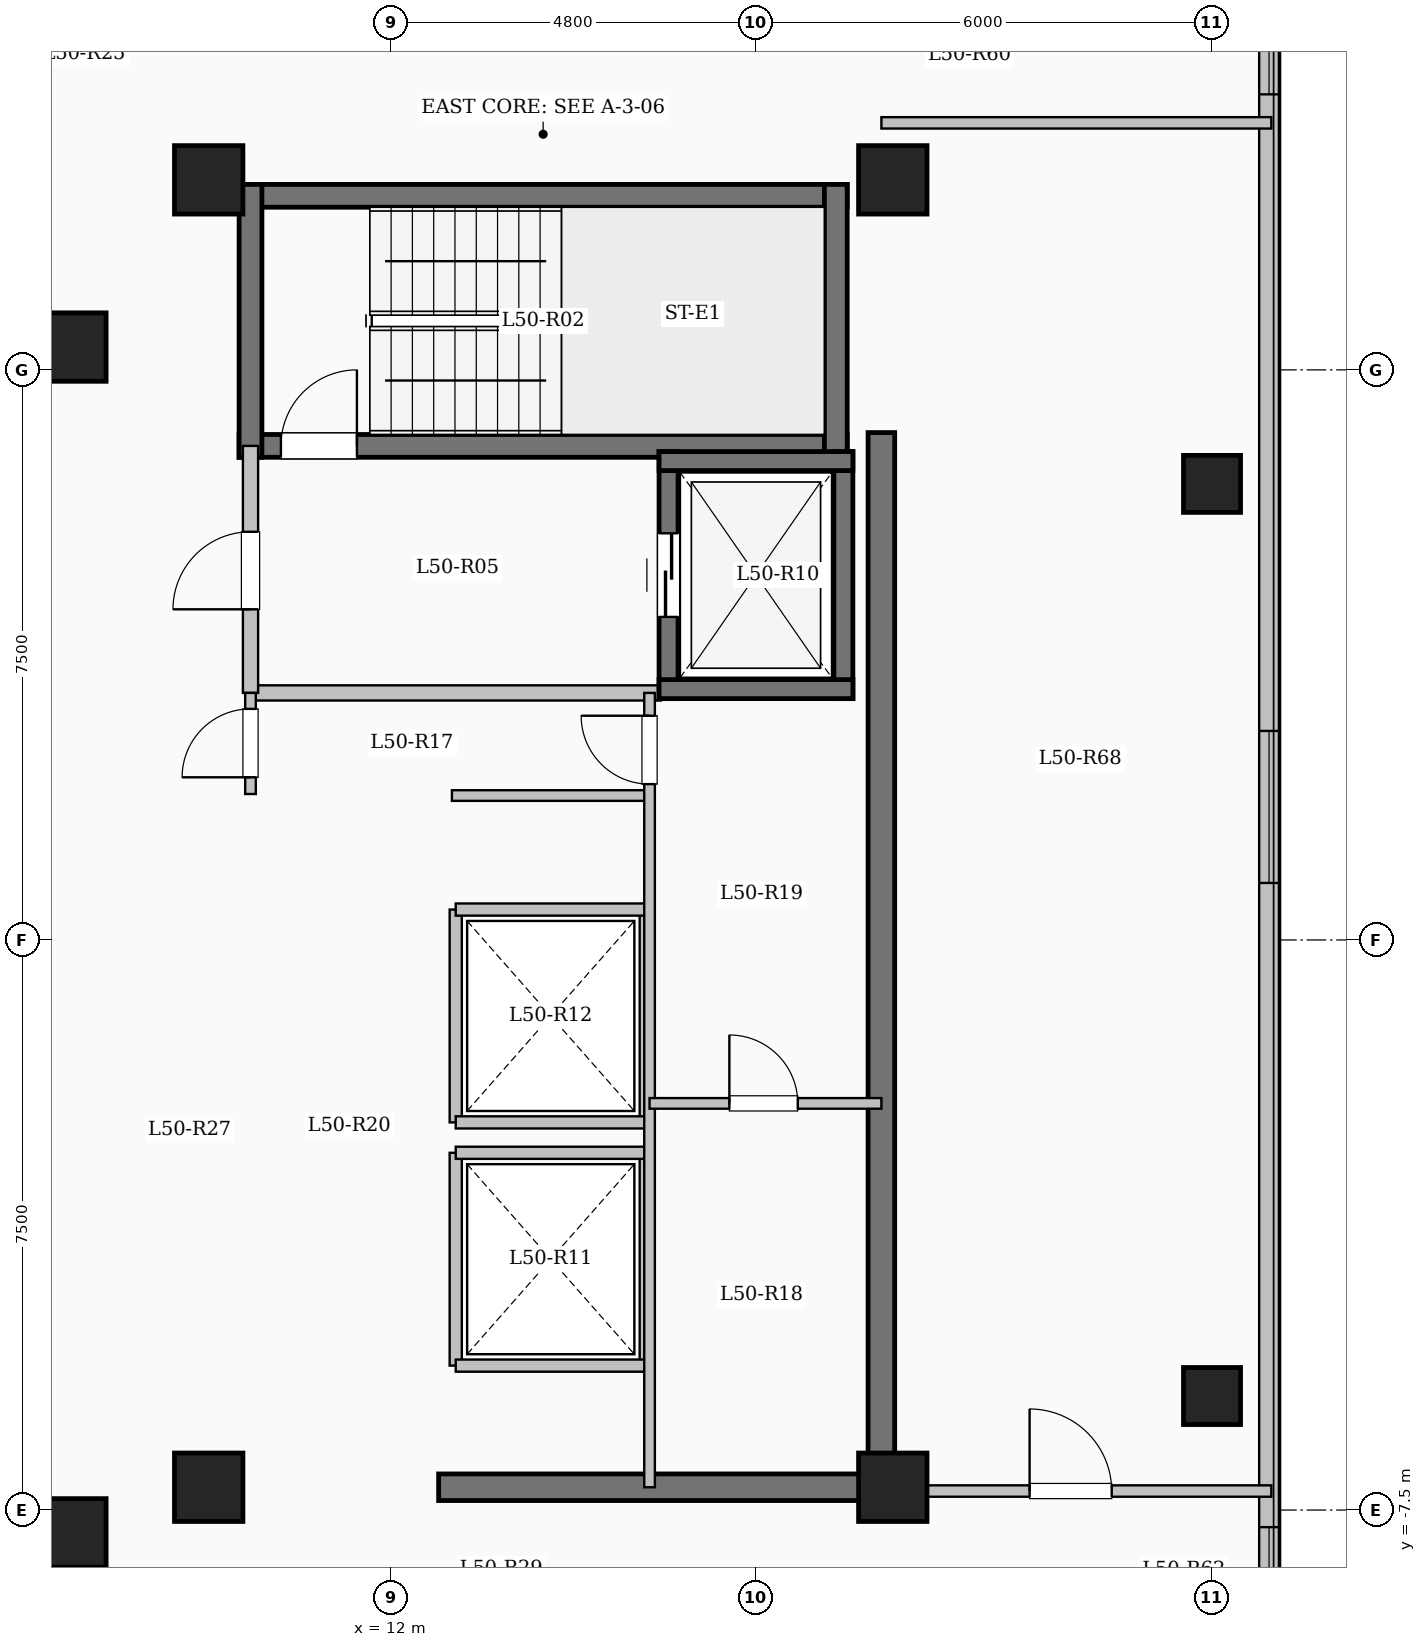
"""IFC4 building model, lengths in metres.
Left out: names, types, materials, properties, quantities, classifications, styles, units other than length and angle.
Written with IfcOpenShell. Run it as: python <this file> out.ifc"""

import sys

from ifc_helpers import new_model, si_unit, direction, frame, frame_2d, origin, origin_2d, place, context, subcontext, project, spatial, rectangle, extrude, element, fill, save


model = new_model("IFC4")
c1 = context("Model", 3, precision=1e-05, world=origin(), true_north=direction((0.0, 1.0)))
c2 = subcontext(c1, "Body", "Model", "MODEL_VIEW")
j1 = project(units=[si_unit("LENGTHUNIT", "METRE"), si_unit("PLANEANGLEUNIT", "RADIAN")], contexts=[c1])
p1 = place(None, origin())
s1 = spatial("IfcSite", under=j1, at=p1, CompositionType="ELEMENT")
p2 = place(p1, origin())
s2 = spatial("IfcBuilding", under=s1, at=p2, CompositionType="ELEMENT")
p3 = place(p2, frame((0.0, 0.0, 186.9)))
s3 = spatial("IfcBuildingStorey", under=s2, at=p3, CompositionType="ELEMENT", Elevation=186.9)
for number, where, z_axis, x_axis in (
    (1, (7.8, -7.8, 0.0), (0.0, 0.0, 1.0), (1.0, 0.0, 0.0)),
    (2, (7.8, 7.8, 0.0), (0.0, 0.0, 1.0), (1.0, 0.0, 0.0)),
    (3, (9.6, -7.2, 0.0), (0.0, 0.0, 1.0), (1.0, 0.0, 0.0)),
    (4, (9.6, 10.0, 0.0), (0.0, 0.0, 1.0), (1.0, 0.0, 0.0)),
    (5, (18.6, -7.2, 0.0), (0.0, 0.0, 1.0), (1.0, 0.0, 0.0)),
    (6, (18.6, 10.0, 0.0), (0.0, 0.0, 1.0), (1.0, 0.0, 0.0)),
):
    element("IfcColumn", number, at=place(p3, frame(where, z_axis=z_axis, x_axis=x_axis)), inside=s3, PredefinedType="COLUMN", context=c2, shape_type="SweptSolid", body=[
        extrude(rectangle(XDim=0.9, YDim=0.9, at=origin_2d()), origin(), (0.0, 0.0, 1.0), 3.35),
    ])
for number, where, z_axis, x_axis in (
    (7, (22.8, -6.0, 0.0), (0.0, 0.0, 1.0), (1.0, 0.0, 0.0)),
    (8, (22.8, 6.0, 0.0), (0.0, 0.0, 1.0), (1.0, 0.0, 0.0)),
):
    element("IfcColumn", number, at=place(p3, frame(where, z_axis=z_axis, x_axis=x_axis)), inside=s3, PredefinedType="COLUMN", context=c2, shape_type="SweptSolid", body=[
        extrude(rectangle(XDim=0.75, YDim=0.75, at=origin_2d()), origin(), (0.0, 0.0, 1.0), 3.35),
    ])
p4 = place(p3, frame((23.55, 17.25, 0.0), z_axis=(0.0, 0.0, 1.0), x_axis=(0.0, -1.0, 0.0)))
e9 = element("IfcWall", 9, at=p4, inside=s3, PredefinedType="SOLIDWALL", context=c2, shape_type="SweptSolid", body=[
    extrude(rectangle(XDim=34.5, YDim=0.26, at=frame_2d((17.25, 0.0))), origin(), (0.0, 0.0, 1.0), 3.1),
])
p5 = place(p4, frame((1.375, 0.0, 0.9)))
e10 = element("IfcOpeningElement", 10, at=p5, cuts=e9, PredefinedType="OPENING", context=c2, shape_type="SweptSolid", body=[
    extrude(rectangle(XDim=2.0, YDim=1.7, at=frame_2d((1.0, 0.85))), frame((0.0, 0.14, 0.0), z_axis=(0.0, -1.0, 0.0), x_axis=(1.0, 0.0, 0.0)), (0.0, 0.0, 1.0), 0.28),
])
p6 = place(p4, frame((5.125, 0.0, 0.95)))
e11 = element("IfcOpeningElement", 11, at=p6, cuts=e9, PredefinedType="OPENING", context=c2, shape_type="SweptSolid", body=[
    extrude(rectangle(XDim=1.0, YDim=1.5, at=frame_2d((0.5, 0.75))), frame((0.0, 0.14, 0.0), z_axis=(0.0, -1.0, 0.0), x_axis=(1.0, 0.0, 0.0)), (0.0, 0.0, 1.0), 0.28),
])
p7 = place(p4, frame((14.5, 0.0, 0.9)))
e12 = element("IfcOpeningElement", 12, at=p7, cuts=e9, PredefinedType="OPENING", context=c2, shape_type="SweptSolid", body=[
    extrude(rectangle(XDim=2.0, YDim=1.7, at=frame_2d((1.0, 0.85))), frame((0.0, 0.14, 0.0), z_axis=(0.0, -1.0, 0.0), x_axis=(1.0, 0.0, 0.0)), (0.0, 0.0, 1.0), 0.28),
])
p8 = place(p4, frame((24.975, 0.0, 0.95)))
e13 = element("IfcOpeningElement", 13, at=p8, cuts=e9, PredefinedType="OPENING", context=c2, shape_type="SweptSolid", body=[
    extrude(rectangle(XDim=1.2, YDim=1.5, at=frame_2d((0.6, 0.75))), frame((0.0, 0.14, 0.0), z_axis=(0.0, -1.0, 0.0), x_axis=(1.0, 0.0, 0.0)), (0.0, 0.0, 1.0), 0.28),
])
p9 = place(p4, frame((29.475, 0.0, 0.9)))
e14 = element("IfcOpeningElement", 14, at=p9, cuts=e9, PredefinedType="OPENING", context=c2, shape_type="SweptSolid", body=[
    extrude(rectangle(XDim=2.2, YDim=1.75, at=frame_2d((1.1, 0.875))), frame((0.0, 0.14, 0.0), z_axis=(0.0, -1.0, 0.0), x_axis=(1.0, 0.0, 0.0)), (0.0, 0.0, 1.0), 0.28),
])
p10 = place(p3, frame((10.0, 9.79, 0.0), z_axis=(0.0, 0.0, 1.0), x_axis=(1.0, 0.0, 0.0)))
e15 = element("IfcWall", 15, at=p10, inside=s3, PredefinedType="SHEAR", context=c2, shape_type="SweptSolid", body=[
    extrude(rectangle(XDim=8.0, YDim=0.3, at=frame_2d((4.0, 0.0))), origin(), (0.0, 0.0, 1.0), 3.35),
])
p11 = place(p3, frame((10.0, 6.5, 0.0), z_axis=(0.0, 0.0, 1.0), x_axis=(1.0, 0.0, 0.0)))
e16 = element("IfcWall", 16, at=p11, inside=s3, PredefinedType="SHEAR", context=c2, shape_type="SweptSolid", body=[
    extrude(rectangle(XDim=8.0, YDim=0.3, at=frame_2d((4.0, 0.0))), origin(), (0.0, 0.0, 1.0), 3.35),
])
p12 = place(p11, frame((0.55, 0.0, 0.0)))
e17 = element("IfcOpeningElement", 17, at=p12, cuts=e16, PredefinedType="OPENING", context=c2, shape_type="SweptSolid", body=[
    extrude(rectangle(XDim=1.0, YDim=2.15, at=frame_2d((0.5, 1.075))), frame((0.0, 0.16, 0.0), z_axis=(0.0, -1.0, 0.0), x_axis=(1.0, 0.0, 0.0)), (0.0, 0.0, 1.0), 0.32),
])
for number, where, z_axis, x_axis in (
    (18, (10.15, 6.35, 0.0), (0.0, 0.0, 1.0), (0.0, 1.0, 0.0)),
    (19, (17.85, 6.35, 0.0), (0.0, 0.0, 1.0), (0.0, 1.0, 0.0)),
):
    element("IfcWall", number, at=place(p3, frame(where, z_axis=z_axis, x_axis=x_axis)), inside=s3, PredefinedType="SHEAR", context=c2, shape_type="SweptSolid", body=[
        extrude(rectangle(XDim=3.59, YDim=0.3, at=frame_2d((1.795, 0.0))), origin(), (0.0, 0.0, 1.0), 3.35),
    ])
p13 = place(p3, frame((10.15, 3.25, 0.0), z_axis=(0.0, 0.0, 1.0), x_axis=(1.0, 0.0, 0.0)))
e20 = element("IfcWall", 20, at=p13, inside=s3, PredefinedType="SOLIDWALL", context=c2, shape_type="SweptSolid", body=[
    extrude(rectangle(XDim=5.4, YDim=0.2, at=frame_2d((2.7, 0.0))), origin(), (0.0, 0.0, 1.0), 3.1),
])
p14 = place(p3, frame((10.15, 3.25, 0.0), z_axis=(0.0, 0.0, 1.0), x_axis=(0.0, 1.0, 0.0)))
e21 = element("IfcWall", 21, at=p14, inside=s3, PredefinedType="SOLIDWALL", context=c2, shape_type="SweptSolid", body=[
    extrude(rectangle(XDim=3.25, YDim=0.2, at=frame_2d((1.625, 0.0))), origin(), (0.0, 0.0, 1.0), 3.1),
])
p15 = place(p14, frame((1.1, 0.0, 0.0)))
e22 = element("IfcOpeningElement", 22, at=p15, cuts=e21, PredefinedType="OPENING", context=c2, shape_type="SweptSolid", body=[
    extrude(rectangle(XDim=1.02, YDim=2.15, at=frame_2d((0.51, 1.075))), frame((0.0, 0.11, 0.0), z_axis=(0.0, -1.0, 0.0), x_axis=(1.0, 0.0, 0.0)), (0.0, 0.0, 1.0), 0.22),
])
p16 = place(p3, frame((15.65, 3.175, 0.0), z_axis=(0.0, 0.0, 1.0), x_axis=(0.0, 1.0, 0.0)))
e23 = element("IfcWall", 23, at=p16, inside=s3, PredefinedType="SHEAR", context=c2, shape_type="SweptSolid", body=[
    extrude(rectangle(XDim=3.25, YDim=0.25, at=frame_2d((1.625, 0.0))), origin(), (0.0, 0.0, 1.0), 3.35),
])
p17 = place(p16, frame((1.075, 0.0, 0.0)))
e24 = element("IfcOpeningElement", 24, at=p17, cuts=e23, PredefinedType="OPENING", context=c2, shape_type="SweptSolid", body=[
    extrude(rectangle(XDim=1.1, YDim=2.15, at=frame_2d((0.55, 1.075))), frame((0.0, 0.135, 0.0), z_axis=(0.0, -1.0, 0.0), x_axis=(1.0, 0.0, 0.0)), (0.0, 0.0, 1.0), 0.27),
])
p18 = place(p3, frame((17.95, 3.175, 0.0), z_axis=(0.0, 0.0, 1.0), x_axis=(0.0, 1.0, 0.0)))
e25 = element("IfcWall", 25, at=p18, inside=s3, PredefinedType="SHEAR", context=c2, shape_type="SweptSolid", body=[
    extrude(rectangle(XDim=3.25, YDim=0.25, at=frame_2d((1.625, 0.0))), origin(), (0.0, 0.0, 1.0), 3.35),
])
for number, where, z_axis, x_axis in (
    (26, (15.525, 3.3, 0.0), (0.0, 0.0, 1.0), (1.0, 0.0, 0.0)),
    (27, (15.525, 6.3, 0.0), (0.0, 0.0, 1.0), (1.0, 0.0, 0.0)),
):
    element("IfcWall", number, at=place(p3, frame(where, z_axis=z_axis, x_axis=x_axis)), inside=s3, PredefinedType="SHEAR", context=c2, shape_type="SweptSolid", body=[
        extrude(rectangle(XDim=2.55, YDim=0.25, at=frame_2d((1.275, 0.0))), origin(), (0.0, 0.0, 1.0), 3.35),
    ])
for number, where, z_axis, x_axis in (
    (28, (12.85, -5.6, 0.0), (0.0, 0.0, 1.0), (0.0, 1.0, 0.0)),
    (29, (15.35, -5.6, 0.0), (0.0, 0.0, 1.0), (0.0, 1.0, 0.0)),
):
    element("IfcWall", number, at=place(p3, frame(where, z_axis=z_axis, x_axis=x_axis)), inside=s3, PredefinedType="SOLIDWALL", context=c2, shape_type="SweptSolid", body=[
        extrude(rectangle(XDim=2.8, YDim=0.16, at=frame_2d((1.4, 0.0))), origin(), (0.0, 0.0, 1.0), 3.1),
    ])
for number, where, z_axis, x_axis in (
    (30, (12.85, -5.6, 0.0), (0.0, 0.0, 1.0), (1.0, 0.0, 0.0)),
    (31, (12.85, -2.8, 0.0), (0.0, 0.0, 1.0), (1.0, 0.0, 0.0)),
):
    element("IfcWall", number, at=place(p3, frame(where, z_axis=z_axis, x_axis=x_axis)), inside=s3, PredefinedType="SOLIDWALL", context=c2, shape_type="SweptSolid", body=[
        extrude(rectangle(XDim=2.5, YDim=0.16, at=frame_2d((1.25, 0.0))), origin(), (0.0, 0.0, 1.0), 3.1),
    ])
for number, where, z_axis, x_axis in (
    (32, (12.85, -2.4, 0.0), (0.0, 0.0, 1.0), (0.0, 1.0, 0.0)),
    (33, (15.35, -2.4, 0.0), (0.0, 0.0, 1.0), (0.0, 1.0, 0.0)),
):
    element("IfcWall", number, at=place(p3, frame(where, z_axis=z_axis, x_axis=x_axis)), inside=s3, PredefinedType="SOLIDWALL", context=c2, shape_type="SweptSolid", body=[
        extrude(rectangle(XDim=2.8, YDim=0.16, at=frame_2d((1.4, 0.0))), origin(), (0.0, 0.0, 1.0), 3.1),
    ])
for number, where, z_axis, x_axis in (
    (34, (12.85, -2.4, 0.0), (0.0, 0.0, 1.0), (1.0, 0.0, 0.0)),
    (35, (12.85, 0.4, 0.0), (0.0, 0.0, 1.0), (1.0, 0.0, 0.0)),
):
    element("IfcWall", number, at=place(p3, frame(where, z_axis=z_axis, x_axis=x_axis)), inside=s3, PredefinedType="SOLIDWALL", context=c2, shape_type="SweptSolid", body=[
        extrude(rectangle(XDim=2.5, YDim=0.16, at=frame_2d((1.25, 0.0))), origin(), (0.0, 0.0, 1.0), 3.1),
    ])
p19 = place(p3, frame((18.45, -7.375, 0.0), z_axis=(0.0, 0.0, 1.0), x_axis=(0.0, 1.0, 0.0)))
e36 = element("IfcWall", 36, at=p19, inside=s3, PredefinedType="SHEAR", context=c2, shape_type="SweptSolid", body=[
    extrude(rectangle(XDim=14.05, YDim=0.35, at=frame_2d((7.025, 0.0))), origin(), (0.0, 0.0, 1.0), 3.35),
])
p20 = place(p3, frame((12.625, -7.2, 0.0), z_axis=(0.0, 0.0, 1.0), x_axis=(1.0, 0.0, 0.0)))
e37 = element("IfcWall", 37, at=p20, inside=s3, PredefinedType="SHEAR", context=c2, shape_type="SweptSolid", body=[
    extrude(rectangle(XDim=6.0, YDim=0.35, at=frame_2d((3.0, 0.0))), origin(), (0.0, 0.0, 1.0), 3.35),
])
p21 = place(p3, frame((12.8, 1.9, 0.0), z_axis=(0.0, 0.0, 1.0), x_axis=(1.0, 0.0, 0.0)))
e38 = element("IfcWall", 38, at=p21, inside=s3, PredefinedType="PARTITIONING", context=c2, shape_type="SweptSolid", body=[
    extrude(rectangle(XDim=2.6, YDim=0.14, at=frame_2d((1.3, 0.0))), origin(), (0.0, 0.0, 1.0), 3.1),
])
p22 = place(p3, frame((10.15, 1.92, 0.0), z_axis=(0.0, 0.0, 1.0), x_axis=(0.0, 1.0, 0.0)))
e39 = element("IfcWall", 39, at=p22, inside=s3, PredefinedType="PARTITIONING", context=c2, shape_type="SweptSolid", body=[
    extrude(rectangle(XDim=1.33, YDim=0.14, at=frame_2d((0.665, 0.0))), origin(), (0.0, 0.0, 1.0), 3.1),
])
p23 = place(p22, frame((0.22, 0.0, 0.0)))
e40 = element("IfcOpeningElement", 40, at=p23, cuts=e39, PredefinedType="OPENING", context=c2, shape_type="SweptSolid", body=[
    extrude(rectangle(XDim=0.9, YDim=2.08, at=frame_2d((0.45, 1.04))), frame((0.0, 0.08, 0.0), z_axis=(0.0, -1.0, 0.0), x_axis=(1.0, 0.0, 0.0)), (0.0, 0.0, 1.0), 0.16),
])
p24 = place(p3, frame((15.4, -7.2, 0.0), z_axis=(0.0, 0.0, 1.0), x_axis=(0.0, 1.0, 0.0)))
e41 = element("IfcWall", 41, at=p24, inside=s3, PredefinedType="PARTITIONING", context=c2, shape_type="SweptSolid", body=[
    extrude(rectangle(XDim=10.45, YDim=0.14, at=frame_2d((5.225, 0.0))), origin(), (0.0, 0.0, 1.0), 3.1),
])
p25 = place(p24, frame((9.25, 0.0, 0.0)))
e42 = element("IfcOpeningElement", 42, at=p25, cuts=e41, PredefinedType="OPENING", context=c2, shape_type="SweptSolid", body=[
    extrude(rectangle(XDim=0.9, YDim=2.08, at=frame_2d((0.45, 1.04))), frame((0.0, 0.08, 0.0), z_axis=(0.0, -1.0, 0.0), x_axis=(1.0, 0.0, 0.0)), (0.0, 0.0, 1.0), 0.16),
])
p26 = place(p3, frame((15.4, -2.15, 0.0), z_axis=(0.0, 0.0, 1.0), x_axis=(1.0, 0.0, 0.0)))
e43 = element("IfcWall", 43, at=p26, inside=s3, PredefinedType="PARTITIONING", context=c2, shape_type="SweptSolid", body=[
    extrude(rectangle(XDim=3.05, YDim=0.14, at=frame_2d((1.525, 0.0))), origin(), (0.0, 0.0, 1.0), 3.1),
])
p27 = place(p26, frame((1.05, 0.0, 0.0)))
e44 = element("IfcOpeningElement", 44, at=p27, cuts=e43, PredefinedType="OPENING", context=c2, shape_type="SweptSolid", body=[
    extrude(rectangle(XDim=0.9, YDim=2.08, at=frame_2d((0.45, 1.04))), frame((0.0, 0.08, 0.0), z_axis=(0.0, -1.0, 0.0), x_axis=(1.0, 0.0, 0.0)), (0.0, 0.0, 1.0), 0.16),
])
p28 = place(p3, frame((18.45, -7.25, 0.0), z_axis=(0.0, 0.0, 1.0), x_axis=(1.0, 0.0, 0.0)))
e45 = element("IfcWall", 45, at=p28, inside=s3, PredefinedType="PARTITIONING", context=c2, shape_type="SweptSolid", body=[
    extrude(rectangle(XDim=5.13, YDim=0.15, at=frame_2d((2.565, 0.0))), origin(), (0.0, 0.0, 1.0), 3.1),
])
p29 = place(p28, frame((1.95, 0.0, 0.0)))
e46 = element("IfcOpeningElement", 46, at=p29, cuts=e45, PredefinedType="OPENING", context=c2, shape_type="SweptSolid", body=[
    extrude(rectangle(XDim=1.08, YDim=2.15, at=frame_2d((0.54, 1.075))), frame((0.0, 0.085, 0.0), z_axis=(0.0, -1.0, 0.0), x_axis=(1.0, 0.0, 0.0)), (0.0, 0.0, 1.0), 0.17),
])
p30 = place(p3, frame((18.45, 10.75, 0.0), z_axis=(0.0, 0.0, 1.0), x_axis=(1.0, 0.0, 0.0)))
e47 = element("IfcWall", 47, at=p30, inside=s3, PredefinedType="PARTITIONING", context=c2, shape_type="SweptSolid", body=[
    extrude(rectangle(XDim=5.13, YDim=0.15, at=frame_2d((2.565, 0.0))), origin(), (0.0, 0.0, 1.0), 3.1),
])
p31 = place(p6, origin())
e48 = element("IfcWindow", 48, at=p31, inside=s3, PartitioningType="SINGLE_PANEL", PredefinedType="WINDOW", context=c2, shape_type="SweptSolid", body=[
    extrude(rectangle(XDim=1.0, YDim=1.5, at=frame_2d((0.5, 0.75))), frame((0.0, 0.03, 0.0), z_axis=(0.0, -1.0, 0.0), x_axis=(1.0, 0.0, 0.0)), (0.0, 0.0, 1.0), 0.06),
])
fill(e11, e48)
p32 = place(p7, origin())
e49 = element("IfcWindow", 49, at=p32, inside=s3, PartitioningType="SINGLE_PANEL", PredefinedType="WINDOW", context=c2, shape_type="SweptSolid", body=[
    extrude(rectangle(XDim=2.0, YDim=1.7, at=frame_2d((1.0, 0.85))), frame((0.0, 0.03, 0.0), z_axis=(0.0, -1.0, 0.0), x_axis=(1.0, 0.0, 0.0)), (0.0, 0.0, 1.0), 0.06),
])
fill(e12, e49)
p33 = place(p8, origin())
e50 = element("IfcWindow", 50, at=p33, inside=s3, PartitioningType="SINGLE_PANEL", PredefinedType="WINDOW", context=c2, shape_type="SweptSolid", body=[
    extrude(rectangle(XDim=1.2, YDim=1.5, at=frame_2d((0.6, 0.75))), frame((0.0, 0.03, 0.0), z_axis=(0.0, -1.0, 0.0), x_axis=(1.0, 0.0, 0.0)), (0.0, 0.0, 1.0), 0.06),
])
fill(e13, e50)
p34 = place(p12, origin())
e51 = element("IfcDoor", 51, at=p34, inside=s3, OperationType="SINGLE_SWING_RIGHT", PredefinedType="DOOR", context=c2, shape_type="SweptSolid", body=[
    extrude(rectangle(XDim=1.0, YDim=2.15, at=frame_2d((0.5, 1.075))), frame((0.0, 0.025, 0.0), z_axis=(0.0, -1.0, 0.0), x_axis=(1.0, 0.0, 0.0)), (0.0, 0.0, 1.0), 0.05),
])
fill(e17, e51)
p35 = place(p15, origin())
e52 = element("IfcDoor", 52, at=p35, inside=s3, OperationType="SINGLE_SWING_LEFT", PredefinedType="DOOR", context=c2, shape_type="SweptSolid", body=[
    extrude(rectangle(XDim=1.02, YDim=2.15, at=frame_2d((0.51, 1.075))), frame((0.0, 0.025, 0.0), z_axis=(0.0, -1.0, 0.0), x_axis=(1.0, 0.0, 0.0)), (0.0, 0.0, 1.0), 0.05),
])
fill(e22, e52)
p36 = place(p17, origin())
e53 = element("IfcDoor", 53, at=p36, inside=s3, OperationType="SLIDING_TO_LEFT", PredefinedType="DOOR", context=c2, shape_type="SweptSolid", body=[
    extrude(rectangle(XDim=1.1, YDim=2.15, at=frame_2d((0.55, 1.075))), frame((0.0, 0.025, 0.0), z_axis=(0.0, -1.0, 0.0), x_axis=(1.0, 0.0, 0.0)), (0.0, 0.0, 1.0), 0.05),
])
fill(e24, e53)
p37 = place(p23, origin())
e54 = element("IfcDoor", 54, at=p37, inside=s3, OperationType="SINGLE_SWING_LEFT", PredefinedType="DOOR", context=c2, shape_type="SweptSolid", body=[
    extrude(rectangle(XDim=0.9, YDim=2.08, at=frame_2d((0.45, 1.04))), frame((0.0, 0.025, 0.0), z_axis=(0.0, -1.0, 0.0), x_axis=(1.0, 0.0, 0.0)), (0.0, 0.0, 1.0), 0.05),
])
fill(e40, e54)
p38 = place(p25, origin())
e55 = element("IfcDoor", 55, at=p38, inside=s3, OperationType="SINGLE_SWING_RIGHT", PredefinedType="DOOR", context=c2, shape_type="SweptSolid", body=[
    extrude(rectangle(XDim=0.9, YDim=2.08, at=frame_2d((0.45, 1.04))), frame((0.0, 0.025, 0.0), z_axis=(0.0, -1.0, 0.0), x_axis=(1.0, 0.0, 0.0)), (0.0, 0.0, 1.0), 0.05),
])
fill(e42, e55)
p39 = place(p27, origin())
e56 = element("IfcDoor", 56, at=p39, inside=s3, OperationType="SINGLE_SWING_LEFT", PredefinedType="DOOR", context=c2, shape_type="SweptSolid", body=[
    extrude(rectangle(XDim=0.9, YDim=2.08, at=frame_2d((0.45, 1.04))), frame((0.0, 0.025, 0.0), z_axis=(0.0, -1.0, 0.0), x_axis=(1.0, 0.0, 0.0)), (0.0, 0.0, 1.0), 0.05),
])
fill(e44, e56)
p40 = place(p29, origin())
e57 = element("IfcDoor", 57, at=p40, inside=s3, OperationType="SINGLE_SWING_LEFT", PredefinedType="DOOR", context=c2, shape_type="SweptSolid", body=[
    extrude(rectangle(XDim=1.08, YDim=2.15, at=frame_2d((0.54, 1.075))), frame((0.0, 0.025, 0.0), z_axis=(0.0, -1.0, 0.0), x_axis=(1.0, 0.0, 0.0)), (0.0, 0.0, 1.0), 0.05),
])
fill(e46, e57)
save(model, sys.argv[1])
